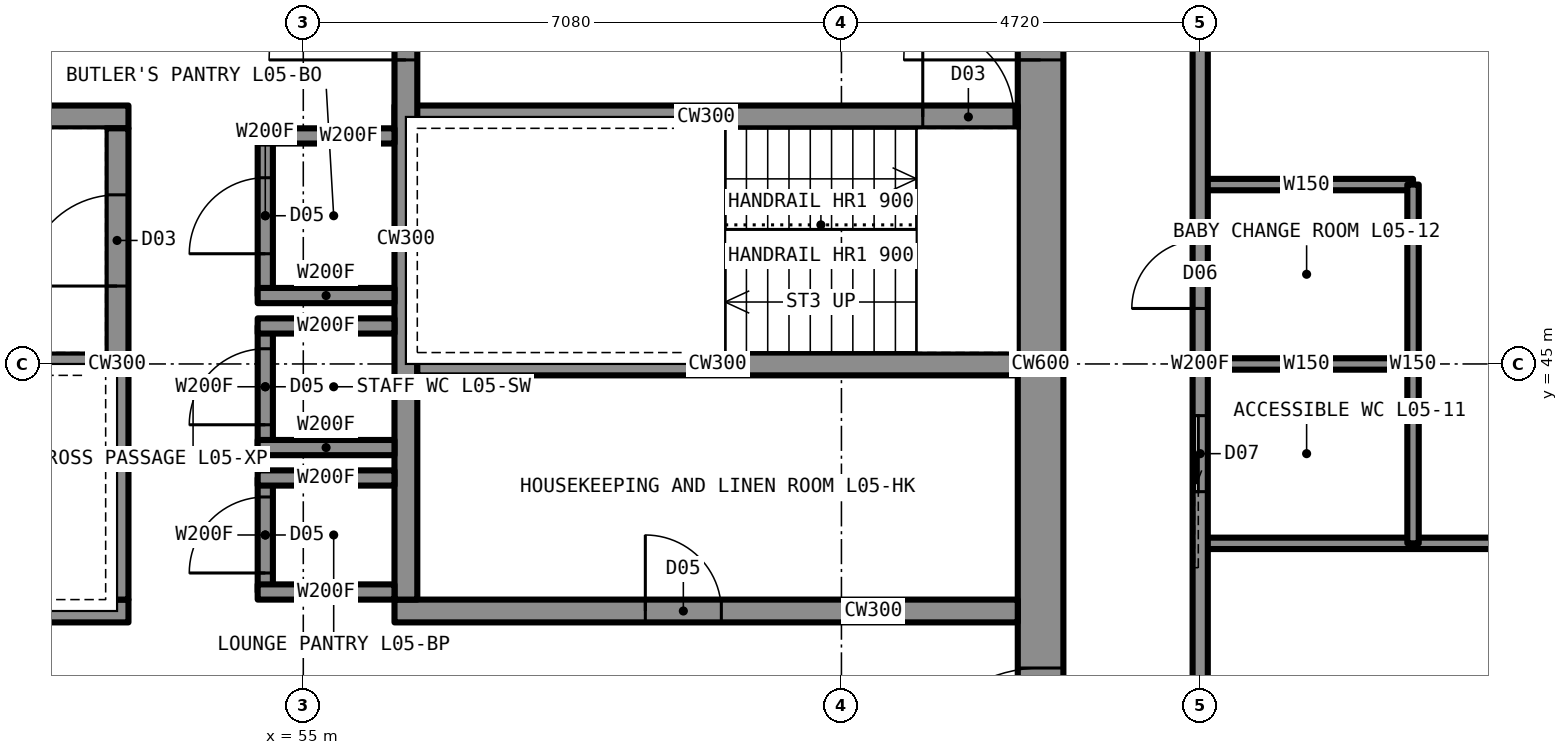
"""IFC4 building model, lengths in metres.
Left out: names, types, materials, properties, quantities, classifications, styles, units other than length and angle.
Written with IfcOpenShell. Run it as: python <this file> out.ifc"""

import sys

from ifc_helpers import new_model, si_unit, direction, frame, frame_2d, origin, place, context, subcontext, project, spatial, rectangle, extrude, element, fill, save


model = new_model("IFC4")
c1 = context("Model", 3, precision=1e-05, world=origin(), true_north=direction((0.0, 1.0)))
c2 = subcontext(c1, "Body", "Model", "MODEL_VIEW")
j1 = project(units=[si_unit("LENGTHUNIT", "METRE"), si_unit("PLANEANGLEUNIT", "RADIAN")], contexts=[c1])
p1 = place(None, origin())
s1 = spatial("IfcSite", under=j1, at=p1, CompositionType="ELEMENT")
p2 = place(p1, origin())
s2 = spatial("IfcBuilding", under=s1, at=p2, CompositionType="ELEMENT")
p3 = place(p2, frame((0.0, 0.0, 25.0)))
s3 = spatial("IfcBuildingStorey", under=s2, at=p3, CompositionType="ELEMENT", Elevation=25.0)
p4 = place(p3, frame((64.7, 35.6, 0.0), z_axis=(0.0, 0.0, 1.0), x_axis=(0.0, 1.0, 0.0)))
e1 = element("IfcWall", 1, at=p4, inside=s3, PredefinedType="SHEAR", context=c2, shape_type="SweptSolid", body=[
    extrude(rectangle(XDim=18.8, YDim=0.6, at=frame_2d((9.4, 0.0))), origin(), (0.0, 0.0, 1.0), 3.5),
])
p5 = place(p4, frame((13.4, 0.0, 0.0)))
e2 = element("IfcOpeningElement", 2, at=p5, cuts=e1, PredefinedType="OPENING", context=c2, shape_type="SweptSolid", body=[
    extrude(rectangle(XDim=1.8, YDim=2.2, at=frame_2d((0.9, 1.1))), frame((0.0, 0.31, 0.0), z_axis=(0.0, -1.0, 0.0), x_axis=(1.0, 0.0, 0.0)), (0.0, 0.0, 1.0), 0.62),
])
p6 = place(p4, frame((3.6, 0.0, 0.0)))
e3 = element("IfcOpeningElement", 3, at=p6, cuts=e1, PredefinedType="OPENING", context=c2, shape_type="SweptSolid", body=[
    extrude(rectangle(XDim=1.8, YDim=2.2, at=frame_2d((0.9, 1.1))), frame((0.0, 0.31, 0.0), z_axis=(0.0, -1.0, 0.0), x_axis=(1.0, 0.0, 0.0)), (0.0, 0.0, 1.0), 0.62),
])
p7 = place(p3, frame((45.6, 48.25, 0.0), z_axis=(0.0, 0.0, 1.0), x_axis=(1.0, 0.0, 0.0)))
e4 = element("IfcWall", 4, at=p7, inside=s3, PredefinedType="SHEAR", context=c2, shape_type="SweptSolid", body=[
    extrude(rectangle(XDim=7.1, YDim=0.3, at=frame_2d((3.55, 0.0))), origin(), (0.0, 0.0, 1.0), 3.5),
])
p8 = place(p3, frame((56.2, 48.25, 0.0), z_axis=(0.0, 0.0, 1.0), x_axis=(1.0, 0.0, 0.0)))
e5 = element("IfcWall", 5, at=p8, inside=s3, PredefinedType="SHEAR", context=c2, shape_type="SweptSolid", body=[
    extrude(rectangle(XDim=8.2, YDim=0.3, at=frame_2d((4.1, 0.0))), origin(), (0.0, 0.0, 1.0), 3.5),
])
p9 = place(p8, frame((6.95, 0.0, 0.0)))
e6 = element("IfcOpeningElement", 6, at=p9, cuts=e5, PredefinedType="OPENING", context=c2, shape_type="SweptSolid", body=[
    extrude(rectangle(XDim=1.2, YDim=2.2, at=frame_2d((0.6, 1.1))), frame((0.0, 0.16, 0.0), z_axis=(0.0, -1.0, 0.0), x_axis=(1.0, 0.0, 0.0)), (0.0, 0.0, 1.0), 0.32),
])
p10 = place(p3, frame((45.6, 41.75, 0.0), z_axis=(0.0, 0.0, 1.0), x_axis=(1.0, 0.0, 0.0)))
e7 = element("IfcWall", 7, at=p10, inside=s3, PredefinedType="SHEAR", context=c2, shape_type="SweptSolid", body=[
    extrude(rectangle(XDim=7.1, YDim=0.3, at=frame_2d((3.55, 0.0))), origin(), (0.0, 0.0, 1.0), 3.5),
])
p11 = place(p3, frame((56.2, 41.75, 0.0), z_axis=(0.0, 0.0, 1.0), x_axis=(1.0, 0.0, 0.0)))
e8 = element("IfcWall", 8, at=p11, inside=s3, PredefinedType="SHEAR", context=c2, shape_type="SweptSolid", body=[
    extrude(rectangle(XDim=8.2, YDim=0.3, at=frame_2d((4.1, 0.0))), origin(), (0.0, 0.0, 1.0), 3.5),
])
p12 = place(p11, frame((3.3, 0.0, 0.0)))
e9 = element("IfcOpeningElement", 9, at=p12, cuts=e8, PredefinedType="OPENING", context=c2, shape_type="SweptSolid", body=[
    extrude(rectangle(XDim=1.0, YDim=2.1, at=frame_2d((0.5, 1.05))), frame((0.0, 0.16, 0.0), z_axis=(0.0, -1.0, 0.0), x_axis=(1.0, 0.0, 0.0)), (0.0, 0.0, 1.0), 0.32),
])
p13 = place(p3, frame((52.55, 41.9, 0.0), z_axis=(0.0, 0.0, 1.0), x_axis=(0.0, 1.0, 0.0)))
e10 = element("IfcWall", 10, at=p13, inside=s3, PredefinedType="SHEAR", context=c2, shape_type="SweptSolid", body=[
    extrude(rectangle(XDim=6.2, YDim=0.3, at=frame_2d((3.1, 0.0))), origin(), (0.0, 0.0, 1.0), 3.5),
])
p14 = place(p13, frame((4.125, 0.0, 0.0)))
e11 = element("IfcOpeningElement", 11, at=p14, cuts=e10, PredefinedType="OPENING", context=c2, shape_type="SweptSolid", body=[
    extrude(rectangle(XDim=1.2, YDim=2.2, at=frame_2d((0.6, 1.1))), frame((0.0, 0.16, 0.0), z_axis=(0.0, -1.0, 0.0), x_axis=(1.0, 0.0, 0.0)), (0.0, 0.0, 1.0), 0.32),
])
p15 = place(p3, frame((56.35, 41.9, 0.0), z_axis=(0.0, 0.0, 1.0), x_axis=(0.0, 1.0, 0.0)))
e12 = element("IfcWall", 12, at=p15, inside=s3, PredefinedType="SHEAR", context=c2, shape_type="SweptSolid", body=[
    extrude(rectangle(XDim=9.5, YDim=0.3, at=frame_2d((4.75, 0.0))), origin(), (0.0, 0.0, 1.0), 3.5),
])
p16 = place(p15, frame((7.1, 0.0, 0.0)))
e13 = element("IfcOpeningElement", 13, at=p16, cuts=e12, PredefinedType="OPENING", context=c2, shape_type="SweptSolid", body=[
    extrude(rectangle(XDim=1.8, YDim=2.2, at=frame_2d((0.9, 1.1))), frame((0.0, 0.16, 0.0), z_axis=(0.0, -1.0, 0.0), x_axis=(1.0, 0.0, 0.0)), (0.0, 0.0, 1.0), 0.32),
])
p17 = place(p3, frame((45.6, 45.0, 0.0), z_axis=(0.0, 0.0, 1.0), x_axis=(1.0, 0.0, 0.0)))
e14 = element("IfcWall", 14, at=p17, inside=s3, PredefinedType="SHEAR", context=c2, shape_type="SweptSolid", body=[
    extrude(rectangle(XDim=6.8, YDim=0.3, at=frame_2d((3.4, 0.0))), origin(), (0.0, 0.0, 1.0), 3.5),
])
p18 = place(p3, frame((56.5, 45.0, 0.0), z_axis=(0.0, 0.0, 1.0), x_axis=(1.0, 0.0, 0.0)))
e15 = element("IfcWall", 15, at=p18, inside=s3, PredefinedType="SHEAR", context=c2, shape_type="SweptSolid", body=[
    extrude(rectangle(XDim=7.9, YDim=0.3, at=frame_2d((3.95, 0.0))), origin(), (0.0, 0.0, 1.0), 3.5),
])
p19 = place(p3, frame((66.8, 42.64, 0.0), z_axis=(0.0, 0.0, 1.0), x_axis=(1.0, 0.0, 0.0)))
e16 = element("IfcWall", 16, at=p19, inside=s3, PredefinedType="PARTITIONING", context=c2, shape_type="SweptSolid", body=[
    extrude(rectangle(XDim=9.9, YDim=0.15, at=frame_2d((4.95, 0.0))), origin(), (0.0, 0.0, 1.0), 2.723),
])
for number, where, z_axis, x_axis in (
    (17, (66.8, 45.0, 0.0), (0.0, 0.0, 1.0), (1.0, 0.0, 0.0)),
    (18, (66.8, 47.36, 0.0), (0.0, 0.0, 1.0), (1.0, 0.0, 0.0)),
):
    element("IfcWall", number, at=place(p3, frame(where, z_axis=z_axis, x_axis=x_axis)), inside=s3, PredefinedType="PARTITIONING", context=c2, shape_type="SweptSolid", body=[
        extrude(rectangle(XDim=2.8, YDim=0.15, at=frame_2d((1.4, 0.0))), origin(), (0.0, 0.0, 1.0), 2.723),
    ])
p20 = place(p3, frame((66.8, 33.2, 0.0), z_axis=(0.0, 0.0, 1.0), x_axis=(0.0, 1.0, 0.0)))
e19 = element("IfcWall", 19, at=p20, inside=s3, PredefinedType="PARTITIONING", context=c2, shape_type="SweptSolid", body=[
    extrude(rectangle(XDim=23.6, YDim=0.2, at=frame_2d((11.8, 0.0))), origin(), (0.0, 0.0, 1.0), 3.33),
])
p21 = place(p20, frame((18.2, 0.0, 0.0)))
e20 = element("IfcOpeningElement", 20, at=p21, cuts=e19, PredefinedType="OPENING", context=c2, shape_type="SweptSolid", body=[
    extrude(rectangle(XDim=1.2, YDim=2.2, at=frame_2d((0.6, 1.1))), frame((0.0, 0.11, 0.0), z_axis=(0.0, -1.0, 0.0), x_axis=(1.0, 0.0, 0.0)), (0.0, 0.0, 1.0), 0.22),
])
p22 = place(p20, frame((10.12, 0.0, 0.0)))
e21 = element("IfcOpeningElement", 21, at=p22, cuts=e19, PredefinedType="OPENING", context=c2, shape_type="SweptSolid", body=[
    extrude(rectangle(XDim=1.0, YDim=2.1, at=frame_2d((0.5, 1.05))), frame((0.0, 0.11, 0.0), z_axis=(0.0, -1.0, 0.0), x_axis=(1.0, 0.0, 0.0)), (0.0, 0.0, 1.0), 0.22),
])
p23 = place(p20, frame((12.53, 0.0, 0.0)))
e22 = element("IfcOpeningElement", 22, at=p23, cuts=e19, PredefinedType="OPENING", context=c2, shape_type="SweptSolid", body=[
    extrude(rectangle(XDim=0.9, YDim=2.1, at=frame_2d((0.45, 1.05))), frame((0.0, 0.11, 0.0), z_axis=(0.0, -1.0, 0.0), x_axis=(1.0, 0.0, 0.0)), (0.0, 0.0, 1.0), 0.22),
])
p24 = place(p20, frame((1.91, 0.0, 0.0)))
e23 = element("IfcOpeningElement", 23, at=p24, cuts=e19, PredefinedType="OPENING", context=c2, shape_type="SweptSolid", body=[
    extrude(rectangle(XDim=0.9, YDim=2.1, at=frame_2d((0.45, 1.05))), frame((0.0, 0.11, 0.0), z_axis=(0.0, -1.0, 0.0), x_axis=(1.0, 0.0, 0.0)), (0.0, 0.0, 1.0), 0.22),
])
p25 = place(p20, frame((6.63, 0.0, 0.0)))
e24 = element("IfcOpeningElement", 24, at=p25, cuts=e19, PredefinedType="OPENING", context=c2, shape_type="SweptSolid", body=[
    extrude(rectangle(XDim=0.9, YDim=2.1, at=frame_2d((0.45, 1.05))), frame((0.0, 0.11, 0.0), z_axis=(0.0, -1.0, 0.0), x_axis=(1.0, 0.0, 0.0)), (0.0, 0.0, 1.0), 0.22),
])
p26 = place(p3, frame((69.6, 42.64, 0.0), z_axis=(0.0, 0.0, 1.0), x_axis=(0.0, 1.0, 0.0)))
e25 = element("IfcWall", 25, at=p26, inside=s3, PredefinedType="PARTITIONING", context=c2, shape_type="SweptSolid", body=[
    extrude(rectangle(XDim=4.72, YDim=0.15, at=frame_2d((2.36, 0.0))), origin(), (0.0, 0.0, 1.0), 3.33),
])
p27 = place(p3, frame((54.5, 42.0, 0.0), z_axis=(0.0, 0.0, 1.0), x_axis=(0.0, 1.0, 0.0)))
e26 = element("IfcWall", 26, at=p27, inside=s3, PredefinedType="PARTITIONING", context=c2, shape_type="SweptSolid", body=[
    extrude(rectangle(XDim=1.5, YDim=0.2, at=frame_2d((0.75, 0.0))), origin(), (0.0, 0.0, 1.0), 3.33),
])
p28 = place(p27, frame((0.25, 0.0, 0.0)))
e27 = element("IfcOpeningElement", 27, at=p28, cuts=e26, PredefinedType="OPENING", context=c2, shape_type="SweptSolid", body=[
    extrude(rectangle(XDim=1.0, YDim=2.1, at=frame_2d((0.5, 1.05))), frame((0.0, 0.11, 0.0), z_axis=(0.0, -1.0, 0.0), x_axis=(1.0, 0.0, 0.0)), (0.0, 0.0, 1.0), 0.22),
])
for number, where, z_axis, x_axis in (
    (28, (54.4, 42.0, 0.0), (0.0, 0.0, 1.0), (1.0, 0.0, 0.0)),
    (29, (54.4, 43.5, 0.0), (0.0, 0.0, 1.0), (1.0, 0.0, 0.0)),
):
    element("IfcWall", number, at=place(p3, frame(where, z_axis=z_axis, x_axis=x_axis)), inside=s3, PredefinedType="PARTITIONING", context=c2, shape_type="SweptSolid", body=[
        extrude(rectangle(XDim=1.8, YDim=0.2, at=frame_2d((0.9, 0.0))), origin(), (0.0, 0.0, 1.0), 3.33),
    ])
p29 = place(p3, frame((54.5, 43.9, 0.0), z_axis=(0.0, 0.0, 1.0), x_axis=(0.0, 1.0, 0.0)))
e30 = element("IfcWall", 30, at=p29, inside=s3, PredefinedType="PARTITIONING", context=c2, shape_type="SweptSolid", body=[
    extrude(rectangle(XDim=1.6, YDim=0.2, at=frame_2d((0.8, 0.0))), origin(), (0.0, 0.0, 1.0), 3.33),
])
p30 = place(p29, frame((0.3, 0.0, 0.0)))
e31 = element("IfcOpeningElement", 31, at=p30, cuts=e30, PredefinedType="OPENING", context=c2, shape_type="SweptSolid", body=[
    extrude(rectangle(XDim=1.0, YDim=2.1, at=frame_2d((0.5, 1.05))), frame((0.0, 0.11, 0.0), z_axis=(0.0, -1.0, 0.0), x_axis=(1.0, 0.0, 0.0)), (0.0, 0.0, 1.0), 0.22),
])
for number, where, z_axis, x_axis in (
    (32, (54.4, 43.9, 0.0), (0.0, 0.0, 1.0), (1.0, 0.0, 0.0)),
    (33, (54.4, 45.5, 0.0), (0.0, 0.0, 1.0), (1.0, 0.0, 0.0)),
):
    element("IfcWall", number, at=place(p3, frame(where, z_axis=z_axis, x_axis=x_axis)), inside=s3, PredefinedType="PARTITIONING", context=c2, shape_type="SweptSolid", body=[
        extrude(rectangle(XDim=1.8, YDim=0.2, at=frame_2d((0.9, 0.0))), origin(), (0.0, 0.0, 1.0), 3.33),
    ])
p31 = place(p3, frame((54.5, 45.9, 0.0), z_axis=(0.0, 0.0, 1.0), x_axis=(0.0, 1.0, 0.0)))
e34 = element("IfcWall", 34, at=p31, inside=s3, PredefinedType="PARTITIONING", context=c2, shape_type="SweptSolid", body=[
    extrude(rectangle(XDim=2.1, YDim=0.2, at=frame_2d((1.05, 0.0))), origin(), (0.0, 0.0, 1.0), 3.33),
])
p32 = place(p31, frame((0.55, 0.0, 0.0)))
e35 = element("IfcOpeningElement", 35, at=p32, cuts=e34, PredefinedType="OPENING", context=c2, shape_type="SweptSolid", body=[
    extrude(rectangle(XDim=1.0, YDim=2.1, at=frame_2d((0.5, 1.05))), frame((0.0, 0.11, 0.0), z_axis=(0.0, -1.0, 0.0), x_axis=(1.0, 0.0, 0.0)), (0.0, 0.0, 1.0), 0.22),
])
for number, where, z_axis, x_axis in (
    (36, (54.4, 45.9, 0.0), (0.0, 0.0, 1.0), (1.0, 0.0, 0.0)),
    (37, (54.4, 48.0, 0.0), (0.0, 0.0, 1.0), (1.0, 0.0, 0.0)),
):
    element("IfcWall", number, at=place(p3, frame(where, z_axis=z_axis, x_axis=x_axis)), inside=s3, PredefinedType="PARTITIONING", context=c2, shape_type="SweptSolid", body=[
        extrude(rectangle(XDim=1.8, YDim=0.2, at=frame_2d((0.9, 0.0))), origin(), (0.0, 0.0, 1.0), 3.33),
    ])
p33 = place(p22, origin())
e38 = element("IfcDoor", 38, at=p33, inside=s3, OperationType="SLIDING_TO_LEFT", PredefinedType="DOOR", context=c2, shape_type="SweptSolid", body=[
    extrude(rectangle(XDim=1.0, YDim=2.1, at=frame_2d((0.5, 1.05))), frame((0.0, 0.025, 0.0), z_axis=(0.0, -1.0, 0.0), x_axis=(1.0, 0.0, 0.0)), (0.0, 0.0, 1.0), 0.05),
])
fill(e21, e38)
p34 = place(p23, origin())
e39 = element("IfcDoor", 39, at=p34, inside=s3, OperationType="SINGLE_SWING_LEFT", PredefinedType="DOOR", context=c2, shape_type="SweptSolid", body=[
    extrude(rectangle(XDim=0.9, YDim=2.1, at=frame_2d((0.45, 1.05))), frame((0.0, 0.025, 0.0), z_axis=(0.0, -1.0, 0.0), x_axis=(1.0, 0.0, 0.0)), (0.0, 0.0, 1.0), 0.05),
])
fill(e22, e39)
p35 = place(p28, origin())
e40 = element("IfcDoor", 40, at=p35, inside=s3, OperationType="SINGLE_SWING_LEFT", PredefinedType="DOOR", context=c2, shape_type="SweptSolid", body=[
    extrude(rectangle(XDim=1.0, YDim=2.1, at=frame_2d((0.5, 1.05))), frame((0.0, 0.025, 0.0), z_axis=(0.0, -1.0, 0.0), x_axis=(1.0, 0.0, 0.0)), (0.0, 0.0, 1.0), 0.05),
])
fill(e27, e40)
p36 = place(p30, origin())
e41 = element("IfcDoor", 41, at=p36, inside=s3, OperationType="SINGLE_SWING_LEFT", PredefinedType="DOOR", context=c2, shape_type="SweptSolid", body=[
    extrude(rectangle(XDim=1.0, YDim=2.1, at=frame_2d((0.5, 1.05))), frame((0.0, 0.025, 0.0), z_axis=(0.0, -1.0, 0.0), x_axis=(1.0, 0.0, 0.0)), (0.0, 0.0, 1.0), 0.05),
])
fill(e31, e41)
p37 = place(p32, origin())
e42 = element("IfcDoor", 42, at=p37, inside=s3, OperationType="SINGLE_SWING_LEFT", PredefinedType="DOOR", context=c2, shape_type="SweptSolid", body=[
    extrude(rectangle(XDim=1.0, YDim=2.1, at=frame_2d((0.5, 1.05))), frame((0.0, 0.025, 0.0), z_axis=(0.0, -1.0, 0.0), x_axis=(1.0, 0.0, 0.0)), (0.0, 0.0, 1.0), 0.05),
])
fill(e35, e42)
p38 = place(p5, origin())
e43 = element("IfcDoor", 43, at=p38, inside=s3, OperationType="DOUBLE_DOOR_SINGLE_SWING", PredefinedType="DOOR", context=c2, shape_type="SweptSolid", body=[
    extrude(rectangle(XDim=1.8, YDim=2.2, at=frame_2d((0.9, 1.1))), frame((0.0, 0.025, 0.0), z_axis=(0.0, -1.0, 0.0), x_axis=(1.0, 0.0, 0.0)), (0.0, 0.0, 1.0), 0.05),
])
fill(e2, e43)
p39 = place(p6, origin())
e44 = element("IfcDoor", 44, at=p39, inside=s3, OperationType="DOUBLE_DOOR_SINGLE_SWING", PredefinedType="DOOR", context=c2, shape_type="SweptSolid", body=[
    extrude(rectangle(XDim=1.8, YDim=2.2, at=frame_2d((0.9, 1.1))), frame((0.0, 0.025, 0.0), z_axis=(0.0, -1.0, 0.0), x_axis=(1.0, 0.0, 0.0)), (0.0, 0.0, 1.0), 0.05),
])
fill(e3, e44)
p40 = place(p16, origin())
e45 = element("IfcDoor", 45, at=p40, inside=s3, OperationType="DOUBLE_DOOR_SINGLE_SWING", PredefinedType="DOOR", context=c2, shape_type="SweptSolid", body=[
    extrude(rectangle(XDim=1.8, YDim=2.2, at=frame_2d((0.9, 1.1))), frame((0.0, 0.025, 0.0), z_axis=(0.0, -1.0, 0.0), x_axis=(1.0, 0.0, 0.0)), (0.0, 0.0, 1.0), 0.05),
])
fill(e13, e45)
p41 = place(p14, origin())
e46 = element("IfcDoor", 46, at=p41, inside=s3, OperationType="SINGLE_SWING_LEFT", PredefinedType="DOOR", context=c2, shape_type="SweptSolid", body=[
    extrude(rectangle(XDim=1.2, YDim=2.2, at=frame_2d((0.6, 1.1))), frame((0.0, 0.025, 0.0), z_axis=(0.0, -1.0, 0.0), x_axis=(1.0, 0.0, 0.0)), (0.0, 0.0, 1.0), 0.05),
])
fill(e11, e46)
p42 = place(p9, origin())
e47 = element("IfcDoor", 47, at=p42, inside=s3, OperationType="SINGLE_SWING_LEFT", PredefinedType="DOOR", context=c2, shape_type="SweptSolid", body=[
    extrude(rectangle(XDim=1.2, YDim=2.2, at=frame_2d((0.6, 1.1))), frame((0.0, 0.025, 0.0), z_axis=(0.0, -1.0, 0.0), x_axis=(1.0, 0.0, 0.0)), (0.0, 0.0, 1.0), 0.05),
])
fill(e6, e47)
p43 = place(p12, origin())
e48 = element("IfcDoor", 48, at=p43, inside=s3, OperationType="SINGLE_SWING_LEFT", PredefinedType="DOOR", context=c2, shape_type="SweptSolid", body=[
    extrude(rectangle(XDim=1.0, YDim=2.1, at=frame_2d((0.5, 1.05))), frame((0.0, 0.025, 0.0), z_axis=(0.0, -1.0, 0.0), x_axis=(1.0, 0.0, 0.0)), (0.0, 0.0, 1.0), 0.05),
])
fill(e9, e48)
save(model, sys.argv[1])
